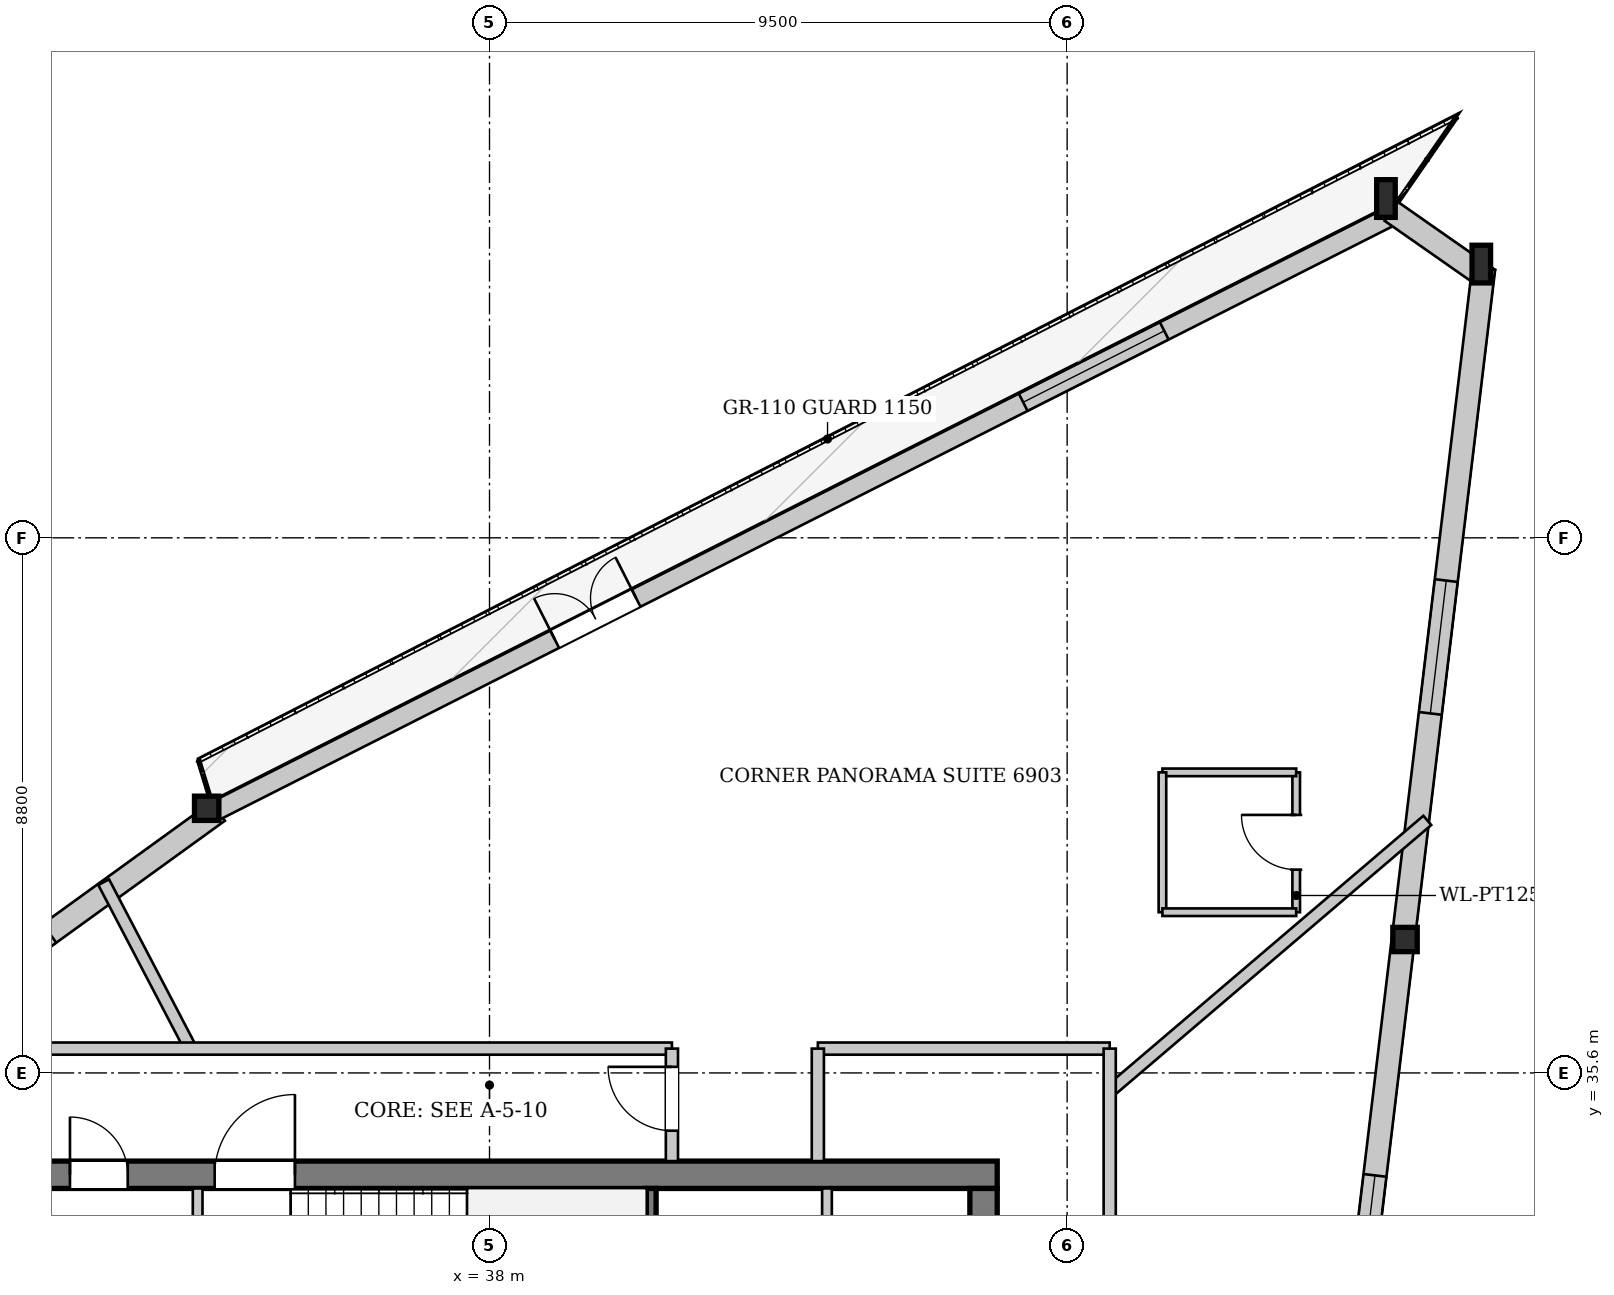
"""IFC4 building model, lengths in metres.
Left out: names, types, materials, properties, quantities, classifications, styles, units other than length and angle.
Written with IfcOpenShell. Run it as: python <this file> out.ifc"""

import sys

from ifc_helpers import new_model, si_unit, direction, frame, frame_2d, origin, origin_2d, place, context, subcontext, project, spatial, rectangle, i_section, extrude, source, transform, mapped, element, fill, save


model = new_model("IFC4")
c1 = context("Model", 3, precision=1e-05, world=origin(), true_north=direction((0.0, 1.0)))
c2 = subcontext(c1, "Body", "Model", "MODEL_VIEW")
j1 = project(units=[si_unit("LENGTHUNIT", "METRE"), si_unit("PLANEANGLEUNIT", "RADIAN")], contexts=[c1])
p1 = place(None, origin())
s1 = spatial("IfcSite", under=j1, at=p1, CompositionType="ELEMENT")
p2 = place(p1, origin())
s2 = spatial("IfcBuilding", under=s1, at=p2, CompositionType="ELEMENT")
p3 = place(p2, frame((0.0, 0.0, 259.7)))
s3 = spatial("IfcBuildingStorey", under=s2, at=p3, CompositionType="ELEMENT", Elevation=259.7)
m1 = source(origin(), c2, "Body", "SweptSolid", [
    extrude(i_section(OverallWidth=0.305, OverallDepth=0.62, WebThickness=0.021, FlangeThickness=0.04, at=origin_2d()), origin(), (0.0, 0.0, 1.0), 3.47),
])
p4 = place(p3, frame((54.539, 48.806, 0.0), z_axis=(-0.13092814069, 0.05480549253, 0.989875840681), x_axis=(-0.386128279598, -0.922445094136, 0.0)))
e1 = element("IfcColumn", 1, at=p4, inside=s3, PredefinedType="COLUMN", context=c2, shape_type="MappedRepresentation", body=[
    mapped(m1, transform((0.0, 0.0, 0.0), x_axis=(1.0, 0.0, 0.0), y_axis=(0.0, 1.0, 0.0), z_axis=(0.0, 0.0, 1.0), scale=1.0)),
])
m2 = source(origin(), c2, "Body", "SweptSolid", [
    extrude(i_section(OverallWidth=0.305, OverallDepth=0.62, WebThickness=0.021, FlangeThickness=0.04, at=origin_2d()), origin(), (0.0, 0.0, 1.0), 3.459),
])
p5 = place(p3, frame((52.938, 49.925, 0.0), z_axis=(-0.112792789454, 0.031692091655, 0.993112983489), x_axis=(-0.270501315838, -0.962719605145, 0.0)))
e2 = element("IfcColumn", 2, at=p5, inside=s3, PredefinedType="COLUMN", context=c2, shape_type="MappedRepresentation", body=[
    mapped(m2, transform((0.0, 0.0, 0.0), x_axis=(1.0, 0.0, 0.0), y_axis=(0.0, 1.0, 0.0), z_axis=(0.0, 0.0, 1.0), scale=1.0)),
])
m3 = source(origin(), c2, "Body", "SweptSolid", [
    extrude(i_section(OverallWidth=0.401, OverallDepth=0.399, WebThickness=0.022, FlangeThickness=0.034, at=origin_2d()), origin(), (0.0, 0.0, 1.0), 3.445),
])
p6 = place(p3, frame((33.426, 40.055, 0.0), z_axis=(-0.044934128524, -0.059817672673, 0.997197457944), x_axis=(0.799545052692, -0.600606117781, 0.0)))
e3 = element("IfcColumn", 3, at=p6, inside=s3, PredefinedType="COLUMN", context=c2, shape_type="MappedRepresentation", body=[
    mapped(m3, transform((0.0, 0.0, 0.0), x_axis=(1.0, 0.0, 0.0), y_axis=(0.0, 1.0, 0.0), z_axis=(0.0, 0.0, 1.0), scale=1.0)),
])
m4 = source(origin(), c2, "Body", "SweptSolid", [
    extrude(i_section(OverallWidth=0.401, OverallDepth=0.399, WebThickness=0.022, FlangeThickness=0.034, at=origin_2d()), origin(), (0.0, 0.0, 1.0), 3.454),
])
p7 = place(p3, frame((53.207, 37.691, 0.0), z_axis=(-0.086441059114, 0.059794878177, 0.994460917202), x_axis=(-0.568895229134, -0.822410006182, 0.0)))
e4 = element("IfcColumn", 4, at=p7, inside=s3, PredefinedType="COLUMN", context=c2, shape_type="MappedRepresentation", body=[
    mapped(m4, transform((0.0, 0.0, 0.0), x_axis=(1.0, 0.0, 0.0), y_axis=(0.0, 1.0, 0.0), z_axis=(0.0, 0.0, 1.0), scale=1.0)),
])
p8 = place(p3, frame((15.819, 27.087, 0.0), z_axis=(0.0, 0.0, 1.0), x_axis=(0.810286001924, 0.586034636421, 0.0)))
e5 = element("IfcWall", 5, at=p8, inside=s3, PredefinedType="SOLIDWALL", context=c2, shape_type="SweptSolid", body=[
    extrude(rectangle(XDim=21.866, YDim=0.38, at=frame_2d((10.933, 0.0))), origin(), (0.0, 0.0, 1.0), 2.872),
])
p9 = place(p8, frame((5.023, 0.0, 0.502)))
e6 = element("IfcOpeningElement", 6, at=p9, cuts=e5, PredefinedType="OPENING", context=c2, shape_type="SweptSolid", body=[
    extrude(rectangle(XDim=2.2, YDim=2.25, at=frame_2d((1.1, 1.125))), frame((0.0, 0.2, 0.0), z_axis=(0.0, -1.0, 0.0), x_axis=(1.0, 0.0, 0.0)), (0.0, 0.0, 1.0), 0.4),
])
p10 = place(p8, frame((16.244, 0.0, 0.502)))
e7 = element("IfcOpeningElement", 7, at=p10, cuts=e5, PredefinedType="OPENING", context=c2, shape_type="SweptSolid", body=[
    extrude(rectangle(XDim=2.2, YDim=2.25, at=frame_2d((1.1, 1.125))), frame((0.0, 0.2, 0.0), z_axis=(0.0, -1.0, 0.0), x_axis=(1.0, 0.0, 0.0)), (0.0, 0.0, 1.0), 0.4),
])
p11 = place(p3, frame((33.498, 39.912, 0.0), z_axis=(0.0, 0.0, 1.0), x_axis=(0.892343104724, 0.451357711192, 0.0)))
e8 = element("IfcWall", 8, at=p11, inside=s3, PredefinedType="SOLIDWALL", context=c2, shape_type="SweptSolid", body=[
    extrude(rectangle(XDim=21.866, YDim=0.32, at=frame_2d((10.933, 0.0))), origin(), (0.0, 0.0, 1.0), 2.872),
])
p12 = place(p11, frame((6.247, 0.0, 0.0)))
e9 = element("IfcOpeningElement", 9, at=p12, cuts=e8, PredefinedType="OPENING", context=c2, shape_type="SweptSolid", body=[
    extrude(rectangle(XDim=1.5, YDim=2.3, at=frame_2d((0.75, 1.15))), frame((0.0, 0.17, 0.0), z_axis=(0.0, -1.0, 0.0), x_axis=(1.0, 0.0, 0.0)), (0.0, 0.0, 1.0), 0.34),
])
p13 = place(p11, frame((14.881, 0.0, 0.402)))
e10 = element("IfcOpeningElement", 10, at=p13, cuts=e8, PredefinedType="OPENING", context=c2, shape_type="SweptSolid", body=[
    extrude(rectangle(XDim=2.6, YDim=2.35, at=frame_2d((1.3, 1.175))), frame((0.0, 0.17, 0.0), z_axis=(0.0, -1.0, 0.0), x_axis=(1.0, 0.0, 0.0)), (0.0, 0.0, 1.0), 0.34),
])
p14 = place(p3, frame((52.83, 49.769, 0.0), z_axis=(0.0, 0.0, 1.0), x_axis=(0.819631236398, -0.572891469932, 0.0)))
e11 = element("IfcWall", 11, at=p14, inside=s3, PredefinedType="SOLIDWALL", context=c2, shape_type="SweptSolid", body=[
    extrude(rectangle(XDim=1.952, YDim=0.38, at=frame_2d((0.976, 0.0))), origin(), (0.0, 0.0, 1.0), 2.872),
])
p15 = place(p3, frame((54.35, 48.829, 0.0), z_axis=(0.0, 0.0, 1.0), x_axis=(-0.118981834581, -0.992896431175, 0.0)))
e12 = element("IfcWall", 12, at=p15, inside=s3, PredefinedType="SOLIDWALL", context=c2, shape_type="SweptSolid", body=[
    extrude(rectangle(XDim=22.39, YDim=0.38, at=frame_2d((11.195, 0.0))), origin(), (0.0, 0.0, 1.0), 2.872),
])
p16 = place(p15, frame((5.169, 0.0, 0.502)))
e13 = element("IfcOpeningElement", 13, at=p16, cuts=e12, PredefinedType="OPENING", context=c2, shape_type="SweptSolid", body=[
    extrude(rectangle(XDim=2.2, YDim=2.25, at=frame_2d((1.1, 1.125))), frame((0.0, 0.2, 0.0), z_axis=(0.0, -1.0, 0.0), x_axis=(1.0, 0.0, 0.0)), (0.0, 0.0, 1.0), 0.4),
])
p17 = place(p15, frame((15.021, 0.0, 0.502)))
e14 = element("IfcOpeningElement", 14, at=p17, cuts=e12, PredefinedType="OPENING", context=c2, shape_type="SweptSolid", body=[
    extrude(rectangle(XDim=2.2, YDim=2.25, at=frame_2d((1.1, 1.125))), frame((0.0, 0.2, 0.0), z_axis=(0.0, -1.0, 0.0), x_axis=(1.0, 0.0, 0.0)), (0.0, 0.0, 1.0), 0.4),
])
p18 = place(p3, frame((29.65, 33.925, 0.0), z_axis=(0.0, 0.0, 1.0), x_axis=(1.0, 0.0, 0.0)))
e15 = element("IfcWall", 15, at=p18, inside=s3, PredefinedType="SHEAR", context=c2, shape_type="SweptSolid", body=[
    extrude(rectangle(XDim=16.7, YDim=0.45, at=frame_2d((8.35, 0.0))), origin(), (0.0, 0.0, 1.0), 3.38),
])
p19 = place(p18, frame((1.45, 0.0, 0.0)))
e16 = element("IfcOpeningElement", 16, at=p19, cuts=e15, PredefinedType="OPENING", context=c2, shape_type="SweptSolid", body=[
    extrude(rectangle(XDim=0.95, YDim=2.1, at=frame_2d((0.475, 1.05))), frame((0.0, 0.235, 0.0), z_axis=(0.0, -1.0, 0.0), x_axis=(1.0, 0.0, 0.0)), (0.0, 0.0, 1.0), 0.47),
])
p20 = place(p18, frame((3.83, 0.0, 0.0)))
e17 = element("IfcOpeningElement", 17, at=p20, cuts=e15, PredefinedType="OPENING", context=c2, shape_type="SweptSolid", body=[
    extrude(rectangle(XDim=1.32, YDim=2.2, at=frame_2d((0.66, 1.1))), frame((0.0, 0.235, 0.0), z_axis=(0.0, -1.0, 0.0), x_axis=(1.0, 0.0, 0.0)), (0.0, 0.0, 1.0), 0.47),
])
p21 = place(p3, frame((46.125, 33.7, 0.0), z_axis=(0.0, 0.0, 1.0), x_axis=(0.0, -1.0, 0.0)))
e18 = element("IfcWall", 18, at=p21, inside=s3, PredefinedType="SHEAR", context=c2, shape_type="SweptSolid", body=[
    extrude(rectangle(XDim=14.2, YDim=0.45, at=frame_2d((7.1, 0.0))), origin(), (0.0, 0.0, 1.0), 3.38),
])
p22 = place(p21, frame((5.18, 0.0, 0.0)))
e19 = element("IfcOpeningElement", 19, at=p22, cuts=e18, PredefinedType="OPENING", context=c2, shape_type="SweptSolid", body=[
    extrude(rectangle(XDim=1.6, YDim=2.2, at=frame_2d((0.8, 1.1))), frame((0.0, 0.235, 0.0), z_axis=(0.0, -1.0, 0.0), x_axis=(1.0, 0.0, 0.0)), (0.0, 0.0, 1.0), 0.47),
])
p23 = place(p21, frame((2.05, 0.0, 0.0)))
e20 = element("IfcOpeningElement", 20, at=p23, cuts=e18, PredefinedType="OPENING", context=c2, shape_type="SweptSolid", body=[
    extrude(rectangle(XDim=0.95, YDim=2.1, at=frame_2d((0.475, 1.05))), frame((0.0, 0.235, 0.0), z_axis=(0.0, -1.0, 0.0), x_axis=(1.0, 0.0, 0.0)), (0.0, 0.0, 1.0), 0.47),
])
p24 = place(p3, frame((40.66, 30.6, 0.0), z_axis=(0.0, 0.0, 1.0), x_axis=(0.0, 1.0, 0.0)))
e21 = element("IfcWall", 21, at=p24, inside=s3, PredefinedType="PARTITIONING", context=c2, shape_type="SweptSolid", body=[
    extrude(rectangle(XDim=3.1, YDim=0.16, at=frame_2d((1.55, 0.0))), origin(), (0.0, 0.0, 1.0), 3.38),
])
p25 = place(p3, frame((33.2, 28.44, 0.0), z_axis=(0.0, 0.0, 1.0), x_axis=(0.0, 1.0, 0.0)))
e22 = element("IfcWall", 22, at=p25, inside=s3, PredefinedType="PARTITIONING", context=c2, shape_type="SweptSolid", body=[
    extrude(rectangle(XDim=5.26, YDim=0.16, at=frame_2d((2.63, 0.0))), origin(), (0.0, 0.0, 1.0), 3.38),
])
p26 = place(p3, frame((43.55, 30.68, 0.0), z_axis=(0.0, 0.0, 1.0), x_axis=(0.0, 1.0, 0.0)))
e23 = element("IfcWall", 23, at=p26, inside=s3, PredefinedType="PARTITIONING", context=c2, shape_type="SweptSolid", body=[
    extrude(rectangle(XDim=3.02, YDim=0.16, at=frame_2d((1.51, 0.0))), origin(), (0.0, 0.0, 1.0), 3.38),
])
p27 = place(p26, frame((0.95, 0.0, 0.0)))
e24 = element("IfcOpeningElement", 24, at=p27, cuts=e23, PredefinedType="OPENING", context=c2, shape_type="SweptSolid", body=[
    extrude(rectangle(XDim=0.95, YDim=2.1, at=frame_2d((0.475, 1.05))), frame((0.0, 0.09, 0.0), z_axis=(0.0, -1.0, 0.0), x_axis=(1.0, 0.0, 0.0)), (0.0, 0.0, 1.0), 0.18),
])
p28 = place(p3, frame((48.2, 35.298, 0.0), z_axis=(0.0, 0.0, 1.0), x_axis=(0.760880946489, 0.648891505007, 0.0)))
e25 = element("IfcWall", 25, at=p28, inside=s3, PredefinedType="PARTITIONING", context=c2, shape_type="SweptSolid", body=[
    extrude(rectangle(XDim=6.865, YDim=0.2, at=frame_2d((3.433, 0.0))), origin(), (0.0, 0.0, 1.0), 3.38),
])
p29 = place(p3, frame((33.086, 36.0, 0.0), z_axis=(0.0, 0.0, 1.0), x_axis=(-0.463265496448, 0.886219543793, 0.0)))
e26 = element("IfcWall", 26, at=p29, inside=s3, PredefinedType="PARTITIONING", context=c2, shape_type="SweptSolid", body=[
    extrude(rectangle(XDim=3.089, YDim=0.2, at=frame_2d((1.544, 0.0))), origin(), (0.0, 0.0, 1.0), 3.38),
])
p30 = place(p3, frame((51.267, 38.243, 0.0), z_axis=(0.0, 0.0, 1.0), x_axis=(0.0, 1.0, 0.0)))
e27 = element("IfcWall", 27, at=p30, inside=s3, PredefinedType="PARTITIONING", context=c2, shape_type="SweptSolid", body=[
    extrude(rectangle(XDim=2.3, YDim=0.125, at=frame_2d((1.15, 0.0))), origin(), (0.0, 0.0, 1.0), 3.38),
])
p31 = place(p30, frame((0.7, 0.0, 0.0)))
e28 = element("IfcOpeningElement", 28, at=p31, cuts=e27, PredefinedType="OPENING", context=c2, shape_type="SweptSolid", body=[
    extrude(rectangle(XDim=0.9, YDim=2.1, at=frame_2d((0.45, 1.05))), frame((0.0, 0.073, 0.0), z_axis=(0.0, -1.0, 0.0), x_axis=(1.0, 0.0, 0.0)), (0.0, 0.0, 1.0), 0.145),
])
p32 = place(p3, frame((51.267, 40.543, 0.0), z_axis=(0.0, 0.0, 1.0), x_axis=(-1.0, 0.0, 0.0)))
e29 = element("IfcWall", 29, at=p32, inside=s3, PredefinedType="PARTITIONING", context=c2, shape_type="SweptSolid", body=[
    extrude(rectangle(XDim=2.2, YDim=0.125, at=frame_2d((1.1, 0.0))), origin(), (0.0, 0.0, 1.0), 3.38),
])
p33 = place(p3, frame((49.067, 40.543, 0.0), z_axis=(0.0, 0.0, 1.0), x_axis=(0.0, -1.0, 0.0)))
e30 = element("IfcWall", 30, at=p33, inside=s3, PredefinedType="PARTITIONING", context=c2, shape_type="SweptSolid", body=[
    extrude(rectangle(XDim=2.3, YDim=0.125, at=frame_2d((1.15, 0.0))), origin(), (0.0, 0.0, 1.0), 3.38),
])
p34 = place(p3, frame((49.067, 38.243, 0.0), z_axis=(0.0, 0.0, 1.0), x_axis=(1.0, 0.0, 0.0)))
e31 = element("IfcWall", 31, at=p34, inside=s3, PredefinedType="PARTITIONING", context=c2, shape_type="SweptSolid", body=[
    extrude(rectangle(XDim=2.2, YDim=0.125, at=frame_2d((1.1, 0.0))), origin(), (0.0, 0.0, 1.0), 3.38),
])
p35 = place(p3, frame((27.87, 36.0, 0.0), z_axis=(0.0, 0.0, 1.0), x_axis=(1.0, 0.0, 0.0)))
e32 = element("IfcWall", 32, at=p35, inside=s3, PredefinedType="PARTITIONING", context=c2, shape_type="SweptSolid", body=[
    extrude(rectangle(XDim=13.13, YDim=0.2, at=frame_2d((6.565, 0.0))), origin(), (0.0, 0.0, 1.0), 3.38),
])
p36 = place(p3, frame((41.0, 34.15, 0.0), z_axis=(0.0, 0.0, 1.0), x_axis=(0.0, 1.0, 0.0)))
e33 = element("IfcWall", 33, at=p36, inside=s3, PredefinedType="PARTITIONING", context=c2, shape_type="SweptSolid", body=[
    extrude(rectangle(XDim=1.85, YDim=0.2, at=frame_2d((0.925, 0.0))), origin(), (0.0, 0.0, 1.0), 3.38),
])
p37 = place(p36, frame((0.5, 0.0, 0.0)))
e34 = element("IfcOpeningElement", 34, at=p37, cuts=e33, PredefinedType="OPENING", context=c2, shape_type="SweptSolid", body=[
    extrude(rectangle(XDim=1.05, YDim=2.2, at=frame_2d((0.525, 1.1))), frame((0.0, 0.11, 0.0), z_axis=(0.0, -1.0, 0.0), x_axis=(1.0, 0.0, 0.0)), (0.0, 0.0, 1.0), 0.22),
])
p38 = place(p3, frame((43.4, 36.0, 0.0), z_axis=(0.0, 0.0, 1.0), x_axis=(1.0, 0.0, 0.0)))
e35 = element("IfcWall", 35, at=p38, inside=s3, PredefinedType="PARTITIONING", context=c2, shape_type="SweptSolid", body=[
    extrude(rectangle(XDim=4.8, YDim=0.2, at=frame_2d((2.4, 0.0))), origin(), (0.0, 0.0, 1.0), 3.38),
])
p39 = place(p3, frame((43.4, 34.15, 0.0), z_axis=(0.0, 0.0, 1.0), x_axis=(0.0, 1.0, 0.0)))
e36 = element("IfcWall", 36, at=p39, inside=s3, PredefinedType="PARTITIONING", context=c2, shape_type="SweptSolid", body=[
    extrude(rectangle(XDim=1.85, YDim=0.2, at=frame_2d((0.925, 0.0))), origin(), (0.0, 0.0, 1.0), 3.055),
])
p40 = place(p3, frame((48.2, 17.2, 0.0), z_axis=(0.0, 0.0, 1.0), x_axis=(0.0, 1.0, 0.0)))
e37 = element("IfcWall", 37, at=p40, inside=s3, PredefinedType="PARTITIONING", context=c2, shape_type="SweptSolid", body=[
    extrude(rectangle(XDim=18.8, YDim=0.2, at=frame_2d((9.4, 0.0))), origin(), (0.0, 0.0, 1.0), 3.125),
])
m5 = source(origin(), c2, "Body", "SweptSolid", [
    extrude(rectangle(XDim=1.5, YDim=2.3, at=frame_2d((0.75, 1.15))), frame((0.0, 0.025, 0.0), z_axis=(0.0, -1.0, 0.0), x_axis=(1.0, 0.0, 0.0)), (0.0, 0.0, 1.0), 0.05),
])
p41 = place(p12, origin())
e38 = element("IfcDoor", 38, at=p41, inside=s3, OperationType="DOUBLE_DOOR_SINGLE_SWING", PredefinedType="DOOR", context=c2, shape_type="MappedRepresentation", body=[
    mapped(m5, transform((0.0, 0.0, 0.0), x_axis=(1.0, 0.0, 0.0), y_axis=(0.0, 1.0, 0.0), z_axis=(0.0, 0.0, 1.0), scale=1.0)),
])
fill(e9, e38)
m6 = source(origin(), c2, "Body", "SweptSolid", [
    extrude(rectangle(XDim=2.6, YDim=2.35, at=frame_2d((1.3, 1.175))), frame((0.0, 0.03, 0.0), z_axis=(0.0, -1.0, 0.0), x_axis=(1.0, 0.0, 0.0)), (0.0, 0.0, 1.0), 0.06),
])
p42 = place(p13, origin())
e39 = element("IfcWindow", 39, at=p42, inside=s3, PartitioningType="SINGLE_PANEL", PredefinedType="WINDOW", context=c2, shape_type="MappedRepresentation", body=[
    mapped(m6, transform((0.0, 0.0, 0.0), x_axis=(1.0, 0.0, 0.0), y_axis=(0.0, 1.0, 0.0), z_axis=(0.0, 0.0, 1.0), scale=1.0)),
])
fill(e10, e39)
m7 = source(origin(), c2, "Body", "SweptSolid", [
    extrude(rectangle(XDim=2.2, YDim=2.25, at=frame_2d((1.1, 1.125))), frame((0.0, 0.03, 0.0), z_axis=(0.0, -1.0, 0.0), x_axis=(1.0, 0.0, 0.0)), (0.0, 0.0, 1.0), 0.06),
])
p43 = place(p16, origin())
e40 = element("IfcWindow", 40, at=p43, inside=s3, PartitioningType="SINGLE_PANEL", PredefinedType="WINDOW", context=c2, shape_type="MappedRepresentation", body=[
    mapped(m7, transform((0.0, 0.0, 0.0), x_axis=(1.0, 0.0, 0.0), y_axis=(0.0, 1.0, 0.0), z_axis=(0.0, 0.0, 1.0), scale=1.0)),
])
fill(e13, e40)
p44 = place(p17, origin())
e41 = element("IfcWindow", 41, at=p44, inside=s3, PartitioningType="SINGLE_PANEL", PredefinedType="WINDOW", context=c2, shape_type="MappedRepresentation", body=[
    mapped(m7, transform((0.0, 0.0, 0.0), x_axis=(1.0, 0.0, 0.0), y_axis=(0.0, 1.0, 0.0), z_axis=(0.0, 0.0, 1.0), scale=1.0)),
])
fill(e14, e41)
m8 = source(origin(), c2, "Body", "SweptSolid", [
    extrude(rectangle(XDim=0.95, YDim=2.1, at=frame_2d((0.475, 1.05))), frame((0.0, 0.025, 0.0), z_axis=(0.0, -1.0, 0.0), x_axis=(1.0, 0.0, 0.0)), (0.0, 0.0, 1.0), 0.05),
])
p45 = place(p19, origin())
e42 = element("IfcDoor", 42, at=p45, inside=s3, OperationType="SINGLE_SWING_LEFT", PredefinedType="DOOR", context=c2, shape_type="MappedRepresentation", body=[
    mapped(m8, transform((0.0, 0.0, 0.0), x_axis=(1.0, 0.0, 0.0), y_axis=(0.0, 1.0, 0.0), z_axis=(0.0, 0.0, 1.0), scale=1.0)),
])
fill(e16, e42)
m9 = source(origin(), c2, "Body", "SweptSolid", [
    extrude(rectangle(XDim=1.32, YDim=2.2, at=frame_2d((0.66, 1.1))), frame((0.0, 0.025, 0.0), z_axis=(0.0, -1.0, 0.0), x_axis=(1.0, 0.0, 0.0)), (0.0, 0.0, 1.0), 0.05),
])
p46 = place(p20, origin())
e43 = element("IfcDoor", 43, at=p46, inside=s3, OperationType="SINGLE_SWING_RIGHT", PredefinedType="DOOR", context=c2, shape_type="MappedRepresentation", body=[
    mapped(m9, transform((0.0, 0.0, 0.0), x_axis=(1.0, 0.0, 0.0), y_axis=(0.0, 1.0, 0.0), z_axis=(0.0, 0.0, 1.0), scale=1.0)),
])
fill(e17, e43)
m10 = source(origin(), c2, "Body", "SweptSolid", [
    extrude(rectangle(XDim=0.9, YDim=2.1, at=frame_2d((0.45, 1.05))), frame((0.0, 0.025, 0.0), z_axis=(0.0, -1.0, 0.0), x_axis=(1.0, 0.0, 0.0)), (0.0, 0.0, 1.0), 0.05),
])
p47 = place(p31, origin())
e44 = element("IfcDoor", 44, at=p47, inside=s3, OperationType="SINGLE_SWING_RIGHT", PredefinedType="DOOR", context=c2, shape_type="MappedRepresentation", body=[
    mapped(m10, transform((0.0, 0.0, 0.0), x_axis=(1.0, 0.0, 0.0), y_axis=(0.0, 1.0, 0.0), z_axis=(0.0, 0.0, 1.0), scale=1.0)),
])
fill(e28, e44)
m11 = source(origin(), c2, "Body", "SweptSolid", [
    extrude(rectangle(XDim=1.05, YDim=2.2, at=frame_2d((0.525, 1.1))), frame((0.0, 0.025, 0.0), z_axis=(0.0, -1.0, 0.0), x_axis=(1.0, 0.0, 0.0)), (0.0, 0.0, 1.0), 0.05),
])
p48 = place(p37, origin())
e45 = element("IfcDoor", 45, at=p48, inside=s3, OperationType="SINGLE_SWING_RIGHT", PredefinedType="DOOR", context=c2, shape_type="MappedRepresentation", body=[
    mapped(m11, transform((0.0, 0.0, 0.0), x_axis=(1.0, 0.0, 0.0), y_axis=(0.0, 1.0, 0.0), z_axis=(0.0, 0.0, 1.0), scale=1.0)),
])
fill(e34, e45)
save(model, sys.argv[1])
